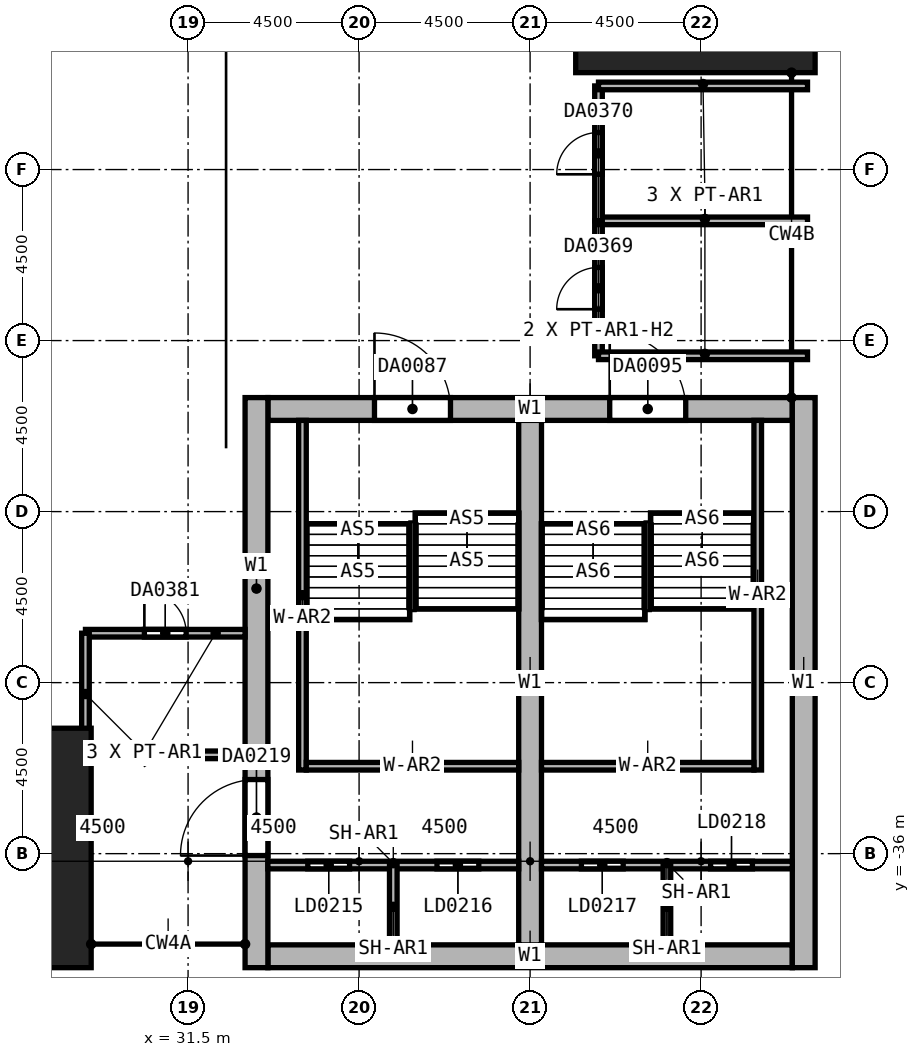
"""IFC4 building model, lengths in metres.
Left out: names, types, materials, properties, quantities, classifications, styles, units other than length and angle.
Written with IfcOpenShell. Run it as: python <this file> out.ifc"""

import sys

from ifc_helpers import new_model, si_unit, direction, frame, frame_2d, origin, origin_2d, place, context, subcontext, project, spatial, rectangle, extrude, element, fill, save


model = new_model("IFC4")
c1 = context("Model", 3, precision=1e-05, world=origin(), true_north=direction((0.0, 1.0)))
c2 = subcontext(c1, "Body", "Model", "MODEL_VIEW")
j1 = project(units=[si_unit("LENGTHUNIT", "METRE"), si_unit("PLANEANGLEUNIT", "RADIAN")], contexts=[c1])
p1 = place(None, origin())
s1 = spatial("IfcSite", under=j1, at=p1, CompositionType="ELEMENT")
p2 = place(p1, origin())
s2 = spatial("IfcBuilding", under=s1, at=p2, CompositionType="ELEMENT")
p3 = place(p2, frame((0.0, 0.0, 19.0)))
s3 = spatial("IfcBuildingStorey", under=s2, at=p3, CompositionType="ELEMENT", Elevation=19.0)
for number, where, z_axis, x_axis in (
    (1, (27.0, -35.85, 0.0), (0.0, 0.0, 1.0), (1.0, 0.0, 0.0)),
    (2, (44.85, -13.5, 0.0), (0.0, 0.0, 1.0), (0.0, 1.0, 0.0)),
):
    element("IfcColumn", number, at=place(p3, frame(where, z_axis=z_axis, x_axis=x_axis)), inside=s3, PredefinedType="COLUMN", context=c2, shape_type="SweptSolid", body=[
        extrude(rectangle(XDim=3.9, YDim=6.3, at=origin_2d()), origin(), (0.0, 0.0, 1.0), 6.0),
    ])
p4 = place(p3, frame((33.6, -24.3, 0.0), z_axis=(0.0, 0.0, 1.0), x_axis=(1.0, 0.0, 0.0)))
e3 = element("IfcWall", 3, at=p4, inside=s3, PredefinedType="SHEAR", context=c2, shape_type="SweptSolid", body=[
    extrude(rectangle(XDim=13.8, YDim=0.6, at=frame_2d((6.9, 0.0))), origin(), (0.0, 0.0, 1.0), 6.0),
])
p5 = place(p4, frame((2.805, 0.0, 0.0)))
e4 = element("IfcOpeningElement", 4, at=p5, cuts=e3, PredefinedType="OPENING", context=c2, shape_type="SweptSolid", body=[
    extrude(rectangle(XDim=2.0, YDim=2.4, at=frame_2d((1.0, 1.2))), frame((0.0, 0.3, 0.0), z_axis=(0.0, -1.0, 0.0), x_axis=(1.0, 0.0, 0.0)), (0.0, 0.0, 1.0), 0.6),
])
p6 = place(p4, frame((8.995, 0.0, 0.0)))
e5 = element("IfcOpeningElement", 5, at=p6, cuts=e3, PredefinedType="OPENING", context=c2, shape_type="SweptSolid", body=[
    extrude(rectangle(XDim=2.0, YDim=2.4, at=frame_2d((1.0, 1.2))), frame((0.0, 0.3, 0.0), z_axis=(0.0, -1.0, 0.0), x_axis=(1.0, 0.0, 0.0)), (0.0, 0.0, 1.0), 0.6),
])
p7 = place(p3, frame((33.6, -38.7, 0.0), z_axis=(0.0, 0.0, 1.0), x_axis=(1.0, 0.0, 0.0)))
e6 = element("IfcWall", 6, at=p7, inside=s3, PredefinedType="SHEAR", context=c2, shape_type="SweptSolid", body=[
    extrude(rectangle(XDim=13.8, YDim=0.6, at=frame_2d((6.9, 0.0))), origin(), (0.0, 0.0, 1.0), 6.0),
])
p8 = place(p3, frame((33.3, -39.0, 0.0), z_axis=(0.0, 0.0, 1.0), x_axis=(0.0, 1.0, 0.0)))
e7 = element("IfcWall", 7, at=p8, inside=s3, PredefinedType="SHEAR", context=c2, shape_type="SweptSolid", body=[
    extrude(rectangle(XDim=15.0, YDim=0.6, at=frame_2d((7.5, 0.0))), origin(), (0.0, 0.0, 1.0), 6.0),
])
p9 = place(p8, frame((2.95, 0.0, 0.0)))
e8 = element("IfcOpeningElement", 8, at=p9, cuts=e7, PredefinedType="OPENING", context=c2, shape_type="SweptSolid", body=[
    extrude(rectangle(XDim=2.0, YDim=2.4, at=frame_2d((1.0, 1.2))), frame((0.0, 0.3, 0.0), z_axis=(0.0, -1.0, 0.0), x_axis=(1.0, 0.0, 0.0)), (0.0, 0.0, 1.0), 0.6),
])
p10 = place(p3, frame((47.7, -39.0, 0.0), z_axis=(0.0, 0.0, 1.0), x_axis=(0.0, 1.0, 0.0)))
e9 = element("IfcWall", 9, at=p10, inside=s3, PredefinedType="SHEAR", context=c2, shape_type="SweptSolid", body=[
    extrude(rectangle(XDim=15.0, YDim=0.6, at=frame_2d((7.5, 0.0))), origin(), (0.0, 0.0, 1.0), 6.0),
])
p11 = place(p3, frame((40.5, -38.4, 0.0), z_axis=(0.0, 0.0, 1.0), x_axis=(0.0, 1.0, 0.0)))
e10 = element("IfcWall", 10, at=p11, inside=s3, PredefinedType="SHEAR", context=c2, shape_type="SweptSolid", body=[
    extrude(rectangle(XDim=13.8, YDim=0.6, at=frame_2d((6.9, 0.0))), origin(), (0.0, 0.0, 1.0), 6.0),
])
p12 = place(p3, frame((34.51, -33.8, 0.0), z_axis=(0.0, 0.0, 1.0), x_axis=(0.0, 1.0, 0.0)))
e11 = element("IfcWall", 11, at=p12, inside=s3, PredefinedType="SOLIDWALL", context=c2, shape_type="SweptSolid", body=[
    extrude(rectangle(XDim=9.2, YDim=0.2, at=frame_2d((4.6, 0.0))), origin(), (0.0, 0.0, 1.0), 6.0),
])
p13 = place(p3, frame((34.61, -33.7, 0.0), z_axis=(0.0, 0.0, 1.0), x_axis=(1.0, 0.0, 0.0)))
e12 = element("IfcWall", 12, at=p13, inside=s3, PredefinedType="SOLIDWALL", context=c2, shape_type="SweptSolid", body=[
    extrude(rectangle(XDim=5.59, YDim=0.2, at=frame_2d((2.795, 0.0))), origin(), (0.0, 0.0, 1.0), 6.0),
])
p14 = place(p3, frame((46.49, -33.8, 0.0), z_axis=(0.0, 0.0, 1.0), x_axis=(0.0, 1.0, 0.0)))
e13 = element("IfcWall", 13, at=p14, inside=s3, PredefinedType="SOLIDWALL", context=c2, shape_type="SweptSolid", body=[
    extrude(rectangle(XDim=9.2, YDim=0.2, at=frame_2d((4.6, 0.0))), origin(), (0.0, 0.0, 1.0), 6.0),
])
p15 = place(p3, frame((40.8, -33.7, 0.0), z_axis=(0.0, 0.0, 1.0), x_axis=(1.0, 0.0, 0.0)))
e14 = element("IfcWall", 14, at=p15, inside=s3, PredefinedType="SOLIDWALL", context=c2, shape_type="SweptSolid", body=[
    extrude(rectangle(XDim=5.59, YDim=0.2, at=frame_2d((2.795, 0.0))), origin(), (0.0, 0.0, 1.0), 6.0),
])
p16 = place(p3, frame((33.6, -36.3, 0.0), z_axis=(0.0, 0.0, 1.0), x_axis=(1.0, 0.0, 0.0)))
e15 = element("IfcWall", 15, at=p16, inside=s3, PredefinedType="SHEAR", context=c2, shape_type="SweptSolid", body=[
    extrude(rectangle(XDim=6.6, YDim=0.2, at=frame_2d((3.3, 0.0))), origin(), (0.0, 0.0, 1.0), 6.0),
])
p17 = place(p16, frame((1.05, 0.0, 0.0)))
e16 = element("IfcOpeningElement", 16, at=p17, cuts=e15, PredefinedType="OPENING", context=c2, shape_type="SweptSolid", body=[
    extrude(rectangle(XDim=1.1, YDim=2.4, at=frame_2d((0.55, 1.2))), frame((0.0, 0.1, 0.0), z_axis=(0.0, -1.0, 0.0), x_axis=(1.0, 0.0, 0.0)), (0.0, 0.0, 1.0), 0.2),
])
p18 = place(p16, frame((4.45, 0.0, 0.0)))
e17 = element("IfcOpeningElement", 17, at=p18, cuts=e15, PredefinedType="OPENING", context=c2, shape_type="SweptSolid", body=[
    extrude(rectangle(XDim=1.1, YDim=2.4, at=frame_2d((0.55, 1.2))), frame((0.0, 0.1, 0.0), z_axis=(0.0, -1.0, 0.0), x_axis=(1.0, 0.0, 0.0)), (0.0, 0.0, 1.0), 0.2),
])
p19 = place(p3, frame((40.8, -36.3, 0.0), z_axis=(0.0, 0.0, 1.0), x_axis=(1.0, 0.0, 0.0)))
e18 = element("IfcWall", 18, at=p19, inside=s3, PredefinedType="SHEAR", context=c2, shape_type="SweptSolid", body=[
    extrude(rectangle(XDim=6.6, YDim=0.2, at=frame_2d((3.3, 0.0))), origin(), (0.0, 0.0, 1.0), 6.0),
])
p20 = place(p19, frame((1.05, 0.0, 0.0)))
e19 = element("IfcOpeningElement", 19, at=p20, cuts=e18, PredefinedType="OPENING", context=c2, shape_type="SweptSolid", body=[
    extrude(rectangle(XDim=1.1, YDim=2.4, at=frame_2d((0.55, 1.2))), frame((0.0, 0.1, 0.0), z_axis=(0.0, -1.0, 0.0), x_axis=(1.0, 0.0, 0.0)), (0.0, 0.0, 1.0), 0.2),
])
p21 = place(p19, frame((4.45, 0.0, 0.0)))
e20 = element("IfcOpeningElement", 20, at=p21, cuts=e18, PredefinedType="OPENING", context=c2, shape_type="SweptSolid", body=[
    extrude(rectangle(XDim=1.1, YDim=2.4, at=frame_2d((0.55, 1.2))), frame((0.0, 0.1, 0.0), z_axis=(0.0, -1.0, 0.0), x_axis=(1.0, 0.0, 0.0)), (0.0, 0.0, 1.0), 0.2),
])
for number, where, z_axis, x_axis in (
    (21, (36.9, -38.4, 0.0), (0.0, 0.0, 1.0), (0.0, 1.0, 0.0)),
    (22, (44.1, -38.4, 0.0), (0.0, 0.0, 1.0), (0.0, 1.0, 0.0)),
):
    element("IfcWall", number, at=place(p3, frame(where, z_axis=z_axis, x_axis=x_axis)), inside=s3, PredefinedType="SHEAR", context=c2, shape_type="SweptSolid", body=[
        extrude(rectangle(XDim=2.1, YDim=0.2, at=frame_2d((1.05, 0.0))), origin(), (0.0, 0.0, 1.0), 6.0),
    ])
p22 = place(p3, frame((42.3, -22.9, 0.0), z_axis=(0.0, 0.0, 1.0), x_axis=(0.0, 1.0, 0.0)))
e23 = element("IfcWall", 23, at=p22, inside=s3, PredefinedType="PARTITIONING", context=c2, shape_type="SweptSolid", body=[
    extrude(rectangle(XDim=3.55, YDim=0.2, at=frame_2d((1.775, 0.0))), origin(), (0.0, 0.0, 1.0), 4.5),
])
p23 = place(p22, frame((1.225, 0.0, 0.0)))
e24 = element("IfcOpeningElement", 24, at=p23, cuts=e23, PredefinedType="OPENING", context=c2, shape_type="SweptSolid", body=[
    extrude(rectangle(XDim=1.1, YDim=2.4, at=frame_2d((0.55, 1.2))), frame((0.0, 0.1, 0.0), z_axis=(0.0, -1.0, 0.0), x_axis=(1.0, 0.0, 0.0)), (0.0, 0.0, 1.0), 0.2),
])
for number, where, z_axis, x_axis in (
    (25, (42.3, -22.9, 0.0), (0.0, 0.0, 1.0), (1.0, 0.0, 0.0)),
    (26, (42.3, -19.35, 0.0), (0.0, 0.0, 1.0), (1.0, 0.0, 0.0)),
):
    element("IfcWall", number, at=place(p3, frame(where, z_axis=z_axis, x_axis=x_axis)), inside=s3, PredefinedType="PARTITIONING", context=c2, shape_type="SweptSolid", body=[
        extrude(rectangle(XDim=5.5, YDim=0.2, at=frame_2d((2.75, 0.0))), origin(), (0.0, 0.0, 1.0), 5.7),
    ])
p24 = place(p3, frame((42.3, -19.35, 0.0), z_axis=(0.0, 0.0, 1.0), x_axis=(0.0, 1.0, 0.0)))
e27 = element("IfcWall", 27, at=p24, inside=s3, PredefinedType="PARTITIONING", context=c2, shape_type="SweptSolid", body=[
    extrude(rectangle(XDim=3.55, YDim=0.2, at=frame_2d((1.775, 0.0))), origin(), (0.0, 0.0, 1.0), 4.5),
])
p25 = place(p24, frame((1.225, 0.0, 0.0)))
e28 = element("IfcOpeningElement", 28, at=p25, cuts=e27, PredefinedType="OPENING", context=c2, shape_type="SweptSolid", body=[
    extrude(rectangle(XDim=1.1, YDim=2.4, at=frame_2d((0.55, 1.2))), frame((0.0, 0.1, 0.0), z_axis=(0.0, -1.0, 0.0), x_axis=(1.0, 0.0, 0.0)), (0.0, 0.0, 1.0), 0.2),
])
p26 = place(p3, frame((42.3, -15.8, 0.0), z_axis=(0.0, 0.0, 1.0), x_axis=(1.0, 0.0, 0.0)))
e29 = element("IfcWall", 29, at=p26, inside=s3, PredefinedType="PARTITIONING", context=c2, shape_type="SweptSolid", body=[
    extrude(rectangle(XDim=5.5, YDim=0.2, at=frame_2d((2.75, 0.0))), origin(), (0.0, 0.0, 1.0), 5.7),
])
p27 = place(p3, frame((28.8, -30.2, 0.0), z_axis=(0.0, 0.0, 1.0), x_axis=(1.0, 0.0, 0.0)))
e30 = element("IfcWall", 30, at=p27, inside=s3, PredefinedType="PARTITIONING", context=c2, shape_type="SweptSolid", body=[
    extrude(rectangle(XDim=4.2, YDim=0.2, at=frame_2d((2.1, 0.0))), origin(), (0.0, 0.0, 1.0), 5.7),
])
p28 = place(p27, frame((1.55, 0.0, 0.0)))
e31 = element("IfcOpeningElement", 31, at=p28, cuts=e30, PredefinedType="OPENING", context=c2, shape_type="SweptSolid", body=[
    extrude(rectangle(XDim=1.1, YDim=2.4, at=frame_2d((0.55, 1.2))), frame((0.0, 0.1, 0.0), z_axis=(0.0, -1.0, 0.0), x_axis=(1.0, 0.0, 0.0)), (0.0, 0.0, 1.0), 0.2),
])
p29 = place(p3, frame((28.8, -33.4, 0.0), z_axis=(0.0, 0.0, 1.0), x_axis=(0.0, 1.0, 0.0)))
e32 = element("IfcWall", 32, at=p29, inside=s3, PredefinedType="PARTITIONING", context=c2, shape_type="SweptSolid", body=[
    extrude(rectangle(XDim=3.2, YDim=0.2, at=frame_2d((1.6, 0.0))), origin(), (0.0, 0.0, 1.0), 5.7),
])
p30 = place(p3, frame((28.8, -33.4, 0.0), z_axis=(0.0, 0.0, 1.0), x_axis=(1.0, 0.0, 0.0)))
e33 = element("IfcWall", 33, at=p30, inside=s3, PredefinedType="PARTITIONING", context=c2, shape_type="SweptSolid", body=[
    extrude(rectangle(XDim=4.2, YDim=0.2, at=frame_2d((2.1, 0.0))), origin(), (0.0, 0.0, 1.0), 5.7),
])
p31 = place(p5, frame((2.0, 0.0, 0.0), z_axis=(0.0, 0.0, 1.0), x_axis=(-1.0, 0.0, 0.0)))
e34 = element("IfcDoor", 34, at=p31, inside=s3, OperationType="DOUBLE_DOOR_SINGLE_SWING", PredefinedType="DOOR", context=c2, shape_type="SweptSolid", body=[
    extrude(rectangle(XDim=2.0, YDim=2.4, at=frame_2d((1.0, 1.2))), frame((0.0, 0.025, 0.0), z_axis=(0.0, -1.0, 0.0), x_axis=(1.0, 0.0, 0.0)), (0.0, 0.0, 1.0), 0.05),
])
fill(e4, e34)
p32 = place(p6, frame((2.0, 0.0, 0.0), z_axis=(0.0, 0.0, 1.0), x_axis=(-1.0, 0.0, 0.0)))
e35 = element("IfcDoor", 35, at=p32, inside=s3, OperationType="DOUBLE_DOOR_SINGLE_SWING", PredefinedType="DOOR", context=c2, shape_type="SweptSolid", body=[
    extrude(rectangle(XDim=2.0, YDim=2.4, at=frame_2d((1.0, 1.2))), frame((0.0, 0.025, 0.0), z_axis=(0.0, -1.0, 0.0), x_axis=(1.0, 0.0, 0.0)), (0.0, 0.0, 1.0), 0.05),
])
fill(e5, e35)
p33 = place(p17, frame((1.1, 0.0, 0.0), z_axis=(0.0, 0.0, 1.0), x_axis=(-1.0, 0.0, 0.0)))
e36 = element("IfcDoor", 36, at=p33, inside=s3, OperationType="DOUBLE_DOOR_SLIDING", PredefinedType="DOOR", context=c2, shape_type="SweptSolid", body=[
    extrude(rectangle(XDim=1.1, YDim=2.4, at=frame_2d((0.55, 1.2))), frame((0.0, 0.025, 0.0), z_axis=(0.0, -1.0, 0.0), x_axis=(1.0, 0.0, 0.0)), (0.0, 0.0, 1.0), 0.05),
])
fill(e16, e36)
p34 = place(p18, frame((1.1, 0.0, 0.0), z_axis=(0.0, 0.0, 1.0), x_axis=(-1.0, 0.0, 0.0)))
e37 = element("IfcDoor", 37, at=p34, inside=s3, OperationType="DOUBLE_DOOR_SLIDING", PredefinedType="DOOR", context=c2, shape_type="SweptSolid", body=[
    extrude(rectangle(XDim=1.1, YDim=2.4, at=frame_2d((0.55, 1.2))), frame((0.0, 0.025, 0.0), z_axis=(0.0, -1.0, 0.0), x_axis=(1.0, 0.0, 0.0)), (0.0, 0.0, 1.0), 0.05),
])
fill(e17, e37)
p35 = place(p20, frame((1.1, 0.0, 0.0), z_axis=(0.0, 0.0, 1.0), x_axis=(-1.0, 0.0, 0.0)))
e38 = element("IfcDoor", 38, at=p35, inside=s3, OperationType="DOUBLE_DOOR_SLIDING", PredefinedType="DOOR", context=c2, shape_type="SweptSolid", body=[
    extrude(rectangle(XDim=1.1, YDim=2.4, at=frame_2d((0.55, 1.2))), frame((0.0, 0.025, 0.0), z_axis=(0.0, -1.0, 0.0), x_axis=(1.0, 0.0, 0.0)), (0.0, 0.0, 1.0), 0.05),
])
fill(e19, e38)
p36 = place(p21, frame((1.1, 0.0, 0.0), z_axis=(0.0, 0.0, 1.0), x_axis=(-1.0, 0.0, 0.0)))
e39 = element("IfcDoor", 39, at=p36, inside=s3, OperationType="DOUBLE_DOOR_SLIDING", PredefinedType="DOOR", context=c2, shape_type="SweptSolid", body=[
    extrude(rectangle(XDim=1.1, YDim=2.4, at=frame_2d((0.55, 1.2))), frame((0.0, 0.025, 0.0), z_axis=(0.0, -1.0, 0.0), x_axis=(1.0, 0.0, 0.0)), (0.0, 0.0, 1.0), 0.05),
])
fill(e20, e39)
p37 = place(p9, origin())
e40 = element("IfcDoor", 40, at=p37, inside=s3, OperationType="DOUBLE_DOOR_SINGLE_SWING", PredefinedType="DOOR", context=c2, shape_type="SweptSolid", body=[
    extrude(rectangle(XDim=2.0, YDim=2.4, at=frame_2d((1.0, 1.2))), frame((0.0, 0.025, 0.0), z_axis=(0.0, -1.0, 0.0), x_axis=(1.0, 0.0, 0.0)), (0.0, 0.0, 1.0), 0.05),
])
fill(e8, e40)
p38 = place(p23, origin())
e41 = element("IfcDoor", 41, at=p38, inside=s3, OperationType="DOUBLE_DOOR_SINGLE_SWING", PredefinedType="DOOR", context=c2, shape_type="SweptSolid", body=[
    extrude(rectangle(XDim=1.1, YDim=2.4, at=frame_2d((0.55, 1.2))), frame((0.0, 0.025, 0.0), z_axis=(0.0, -1.0, 0.0), x_axis=(1.0, 0.0, 0.0)), (0.0, 0.0, 1.0), 0.05),
])
fill(e24, e41)
p39 = place(p25, origin())
e42 = element("IfcDoor", 42, at=p39, inside=s3, OperationType="DOUBLE_DOOR_SINGLE_SWING", PredefinedType="DOOR", context=c2, shape_type="SweptSolid", body=[
    extrude(rectangle(XDim=1.1, YDim=2.4, at=frame_2d((0.55, 1.2))), frame((0.0, 0.025, 0.0), z_axis=(0.0, -1.0, 0.0), x_axis=(1.0, 0.0, 0.0)), (0.0, 0.0, 1.0), 0.05),
])
fill(e28, e42)
p40 = place(p28, origin())
e43 = element("IfcDoor", 43, at=p40, inside=s3, OperationType="DOUBLE_DOOR_SINGLE_SWING", PredefinedType="DOOR", context=c2, shape_type="SweptSolid", body=[
    extrude(rectangle(XDim=1.1, YDim=2.4, at=frame_2d((0.55, 1.2))), frame((0.0, 0.025, 0.0), z_axis=(0.0, -1.0, 0.0), x_axis=(1.0, 0.0, 0.0)), (0.0, 0.0, 1.0), 0.05),
])
fill(e31, e43)
save(model, sys.argv[1])
